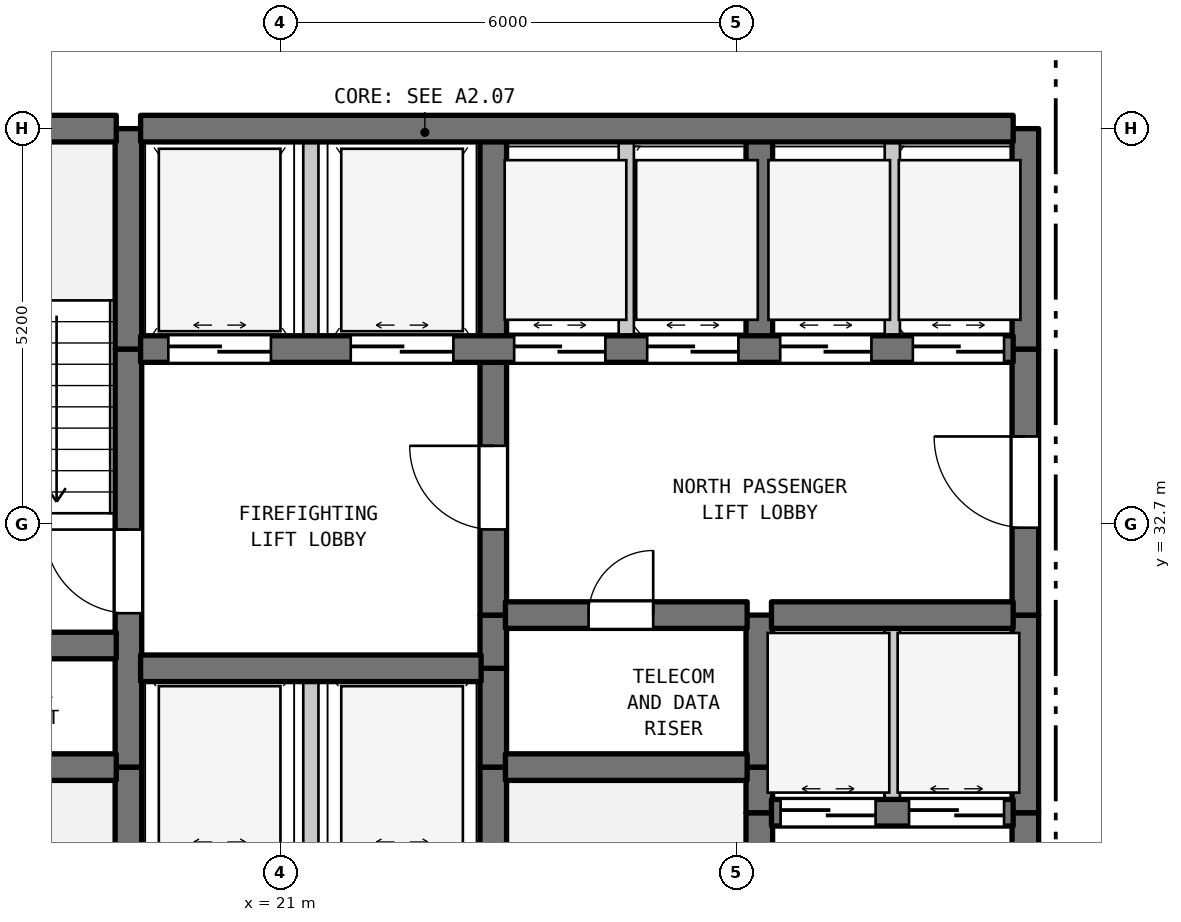
"""IFC4 building model, lengths in metres.
Left out: names, types, materials, properties, quantities, classifications, styles, units other than length and angle.
Written with IfcOpenShell. Run it as: python <this file> out.ifc"""

import sys

from ifc_helpers import new_model, si_unit, direction, frame, frame_2d, origin, place, context, subcontext, project, spatial, rectangle, extrude, element, fill, save


model = new_model("IFC4")
c1 = context("Model", 3, precision=1e-05, world=origin(), true_north=direction((0.0, 1.0)))
c2 = subcontext(c1, "Body", "Model", "MODEL_VIEW")
j1 = project(units=[si_unit("LENGTHUNIT", "METRE"), si_unit("PLANEANGLEUNIT", "RADIAN")], contexts=[c1])
p1 = place(None, origin())
s1 = spatial("IfcSite", under=j1, at=p1, CompositionType="ELEMENT")
p2 = place(p1, origin())
s2 = spatial("IfcBuilding", under=s1, at=p2, CompositionType="ELEMENT")
p3 = place(p2, frame((0.0, 0.0, 49.9)))
s3 = spatial("IfcBuildingStorey", under=s2, at=p3, CompositionType="ELEMENT", Elevation=49.9)
p4 = place(p3, frame((19.0, 28.2, 0.0), z_axis=(0.0, 0.0, 1.0), x_axis=(0.0, 1.0, 0.0)))
e1 = element("IfcWall", 1, at=p4, inside=s3, PredefinedType="SHEAR", context=c2, shape_type="SweptSolid", body=[
    extrude(rectangle(XDim=1.3, YDim=0.35, at=frame_2d((0.65, 0.0))), origin(), (0.0, 0.0, 1.0), 3.385),
])
p5 = place(p3, frame((19.0, 29.5, 0.0), z_axis=(0.0, 0.0, 1.0), x_axis=(0.0, 1.0, 0.0)))
e2 = element("IfcWall", 2, at=p5, inside=s3, PredefinedType="SHEAR", context=c2, shape_type="SweptSolid", body=[
    extrude(rectangle(XDim=5.5, YDim=0.35, at=frame_2d((2.75, 0.0))), origin(), (0.0, 0.0, 1.0), 3.385),
])
p6 = place(p5, frame((2.025, 0.0, 0.0)))
e3 = element("IfcOpeningElement", 3, at=p6, cuts=e2, PredefinedType="OPENING", context=c2, shape_type="SweptSolid", body=[
    extrude(rectangle(XDim=1.1, YDim=2.15, at=frame_2d((0.55, 1.075))), frame((0.0, 0.185, 0.0), z_axis=(0.0, -1.0, 0.0), x_axis=(1.0, 0.0, 0.0)), (0.0, 0.0, 1.0), 0.37),
])
p7 = place(p3, frame((19.0, 35.0, 0.0), z_axis=(0.0, 0.0, 1.0), x_axis=(0.0, 1.0, 0.0)))
e4 = element("IfcWall", 4, at=p7, inside=s3, PredefinedType="SHEAR", context=c2, shape_type="SweptSolid", body=[
    extrude(rectangle(XDim=2.9, YDim=0.35, at=frame_2d((1.45, 0.0))), origin(), (0.0, 0.0, 1.0), 3.385),
])
p8 = place(p3, frame((21.4, 28.2, 0.0), z_axis=(0.0, 0.0, 1.0), x_axis=(0.0, 1.0, 0.0)))
e5 = element("IfcWall", 5, at=p8, inside=s3, PredefinedType="STANDARD", context=c2, shape_type="SweptSolid", body=[
    extrude(rectangle(XDim=2.6, YDim=0.2, at=frame_2d((1.3, 0.0))), origin(), (0.0, 0.0, 1.0), 3.385),
])
p9 = place(p3, frame((21.4, 35.0, 0.0), z_axis=(0.0, 0.0, 1.0), x_axis=(0.0, 1.0, 0.0)))
e6 = element("IfcWall", 6, at=p9, inside=s3, PredefinedType="STANDARD", context=c2, shape_type="SweptSolid", body=[
    extrude(rectangle(XDim=2.9, YDim=0.2, at=frame_2d((1.45, 0.0))), origin(), (0.0, 0.0, 1.0), 3.385),
])
for number, where, z_axis, x_axis in (
    (7, (23.8, 28.2, 0.0), (0.0, 0.0, 1.0), (0.0, 1.0, 0.0)),
    (8, (23.8, 29.5, 0.0), (0.0, 0.0, 1.0), (0.0, 1.0, 0.0)),
):
    element("IfcWall", number, at=place(p3, frame(where, z_axis=z_axis, x_axis=x_axis)), inside=s3, PredefinedType="SHEAR", context=c2, shape_type="SweptSolid", body=[
        extrude(rectangle(XDim=1.3, YDim=0.35, at=frame_2d((0.65, 0.0))), origin(), (0.0, 0.0, 1.0), 3.385),
    ])
p10 = place(p3, frame((23.8, 30.8, 0.0), z_axis=(0.0, 0.0, 1.0), x_axis=(0.0, 1.0, 0.0)))
e9 = element("IfcWall", 9, at=p10, inside=s3, PredefinedType="SHEAR", context=c2, shape_type="SweptSolid", body=[
    extrude(rectangle(XDim=0.7, YDim=0.35, at=frame_2d((0.35, 0.0))), origin(), (0.0, 0.0, 1.0), 3.385),
])
p11 = place(p3, frame((23.8, 31.5, 0.0), z_axis=(0.0, 0.0, 1.0), x_axis=(0.0, 1.0, 0.0)))
e10 = element("IfcWall", 10, at=p11, inside=s3, PredefinedType="SHEAR", context=c2, shape_type="SweptSolid", body=[
    extrude(rectangle(XDim=3.5, YDim=0.35, at=frame_2d((1.75, 0.0))), origin(), (0.0, 0.0, 1.0), 3.385),
])
p12 = place(p11, frame((1.127, 0.0, 0.0)))
e11 = element("IfcOpeningElement", 11, at=p12, cuts=e10, PredefinedType="OPENING", context=c2, shape_type="SweptSolid", body=[
    extrude(rectangle(XDim=1.1, YDim=2.15, at=frame_2d((0.55, 1.075))), frame((0.0, 0.185, 0.0), z_axis=(0.0, -1.0, 0.0), x_axis=(1.0, 0.0, 0.0)), (0.0, 0.0, 1.0), 0.37),
])
p13 = place(p3, frame((23.8, 35.0, 0.0), z_axis=(0.0, 0.0, 1.0), x_axis=(0.0, 1.0, 0.0)))
e12 = element("IfcWall", 12, at=p13, inside=s3, PredefinedType="SHEAR", context=c2, shape_type="SweptSolid", body=[
    extrude(rectangle(XDim=2.9, YDim=0.35, at=frame_2d((1.45, 0.0))), origin(), (0.0, 0.0, 1.0), 3.385),
])
p14 = place(p3, frame((25.55, 35.0, 0.0), z_axis=(0.0, 0.0, 1.0), x_axis=(0.0, 1.0, 0.0)))
e13 = element("IfcWall", 13, at=p14, inside=s3, PredefinedType="STANDARD", context=c2, shape_type="SweptSolid", body=[
    extrude(rectangle(XDim=2.9, YDim=0.2, at=frame_2d((1.45, 0.0))), origin(), (0.0, 0.0, 1.0), 3.385),
])
p15 = place(p3, frame((27.3, 25.6, 0.0), z_axis=(0.0, 0.0, 1.0), x_axis=(0.0, 1.0, 0.0)))
e14 = element("IfcWall", 14, at=p15, inside=s3, PredefinedType="SHEAR", context=c2, shape_type="SweptSolid", body=[
    extrude(rectangle(XDim=3.3, YDim=0.35, at=frame_2d((1.65, 0.0))), origin(), (0.0, 0.0, 1.0), 3.385),
])
p16 = place(p3, frame((27.3, 28.9, 0.0), z_axis=(0.0, 0.0, 1.0), x_axis=(0.0, 1.0, 0.0)))
e15 = element("IfcWall", 15, at=p16, inside=s3, PredefinedType="SHEAR", context=c2, shape_type="SweptSolid", body=[
    extrude(rectangle(XDim=0.6, YDim=0.35, at=frame_2d((0.3, 0.0))), origin(), (0.0, 0.0, 1.0), 3.385),
])
p17 = place(p3, frame((27.3, 29.5, 0.0), z_axis=(0.0, 0.0, 1.0), x_axis=(0.0, 1.0, 0.0)))
e16 = element("IfcWall", 16, at=p17, inside=s3, PredefinedType="SHEAR", context=c2, shape_type="SweptSolid", body=[
    extrude(rectangle(XDim=2.0, YDim=0.35, at=frame_2d((1.0, 0.0))), origin(), (0.0, 0.0, 1.0), 3.385),
])
p18 = place(p3, frame((27.3, 35.0, 0.0), z_axis=(0.0, 0.0, 1.0), x_axis=(0.0, 1.0, 0.0)))
e17 = element("IfcWall", 17, at=p18, inside=s3, PredefinedType="SHEAR", context=c2, shape_type="SweptSolid", body=[
    extrude(rectangle(XDim=2.9, YDim=0.35, at=frame_2d((1.45, 0.0))), origin(), (0.0, 0.0, 1.0), 3.385),
])
p19 = place(p3, frame((29.05, 28.9, 0.0), z_axis=(0.0, 0.0, 1.0), x_axis=(0.0, 1.0, 0.0)))
e18 = element("IfcWall", 18, at=p19, inside=s3, PredefinedType="STANDARD", context=c2, shape_type="SweptSolid", body=[
    extrude(rectangle(XDim=2.6, YDim=0.2, at=frame_2d((1.3, 0.0))), origin(), (0.0, 0.0, 1.0), 3.385),
])
p20 = place(p3, frame((29.05, 35.0, 0.0), z_axis=(0.0, 0.0, 1.0), x_axis=(0.0, 1.0, 0.0)))
e19 = element("IfcWall", 19, at=p20, inside=s3, PredefinedType="STANDARD", context=c2, shape_type="SweptSolid", body=[
    extrude(rectangle(XDim=2.9, YDim=0.2, at=frame_2d((1.45, 0.0))), origin(), (0.0, 0.0, 1.0), 3.385),
])
p21 = place(p3, frame((30.8, 25.6, 0.0), z_axis=(0.0, 0.0, 1.0), x_axis=(0.0, 1.0, 0.0)))
e20 = element("IfcWall", 20, at=p21, inside=s3, PredefinedType="SHEAR", context=c2, shape_type="SweptSolid", body=[
    extrude(rectangle(XDim=3.3, YDim=0.35, at=frame_2d((1.65, 0.0))), origin(), (0.0, 0.0, 1.0), 3.385),
])
p22 = place(p21, frame((0.978, 0.0, 0.0)))
e21 = element("IfcOpeningElement", 21, at=p22, cuts=e20, PredefinedType="OPENING", context=c2, shape_type="SweptSolid", body=[
    extrude(rectangle(XDim=1.2, YDim=2.2, at=frame_2d((0.6, 1.1))), frame((0.0, 0.185, 0.0), z_axis=(0.0, -1.0, 0.0), x_axis=(1.0, 0.0, 0.0)), (0.0, 0.0, 1.0), 0.37),
])
p23 = place(p3, frame((30.8, 28.9, 0.0), z_axis=(0.0, 0.0, 1.0), x_axis=(0.0, 1.0, 0.0)))
e22 = element("IfcWall", 22, at=p23, inside=s3, PredefinedType="SHEAR", context=c2, shape_type="SweptSolid", body=[
    extrude(rectangle(XDim=2.6, YDim=0.35, at=frame_2d((1.3, 0.0))), origin(), (0.0, 0.0, 1.0), 3.385),
])
p24 = place(p3, frame((30.8, 31.5, 0.0), z_axis=(0.0, 0.0, 1.0), x_axis=(0.0, 1.0, 0.0)))
e23 = element("IfcWall", 23, at=p24, inside=s3, PredefinedType="SHEAR", context=c2, shape_type="SweptSolid", body=[
    extrude(rectangle(XDim=3.5, YDim=0.35, at=frame_2d((1.75, 0.0))), origin(), (0.0, 0.0, 1.0), 3.385),
])
p25 = place(p24, frame((1.15, 0.0, 0.0)))
e24 = element("IfcOpeningElement", 24, at=p25, cuts=e23, PredefinedType="OPENING", context=c2, shape_type="SweptSolid", body=[
    extrude(rectangle(XDim=1.2, YDim=2.2, at=frame_2d((0.6, 1.1))), frame((0.0, 0.185, 0.0), z_axis=(0.0, -1.0, 0.0), x_axis=(1.0, 0.0, 0.0)), (0.0, 0.0, 1.0), 0.37),
])
p26 = place(p3, frame((30.8, 35.0, 0.0), z_axis=(0.0, 0.0, 1.0), x_axis=(0.0, 1.0, 0.0)))
e25 = element("IfcWall", 25, at=p26, inside=s3, PredefinedType="SHEAR", context=c2, shape_type="SweptSolid", body=[
    extrude(rectangle(XDim=2.9, YDim=0.35, at=frame_2d((1.45, 0.0))), origin(), (0.0, 0.0, 1.0), 3.385),
])
p27 = place(p3, frame((27.46, 28.9, 0.0), z_axis=(0.0, 0.0, 1.0), x_axis=(1.0, 0.0, 0.0)))
e26 = element("IfcWall", 26, at=p27, inside=s3, PredefinedType="SHEAR", context=c2, shape_type="SweptSolid", body=[
    extrude(rectangle(XDim=3.18, YDim=0.35, at=frame_2d((1.59, 0.0))), origin(), (0.0, 0.0, 1.0), 3.385),
])
p28 = place(p27, frame((0.12, 0.0, 0.0)))
e27 = element("IfcOpeningElement", 27, at=p28, cuts=e26, PredefinedType="OPENING", context=c2, shape_type="SweptSolid", body=[
    extrude(rectangle(XDim=1.25, YDim=2.2, at=frame_2d((0.625, 1.1))), frame((0.0, 0.185, 0.0), z_axis=(0.0, -1.0, 0.0), x_axis=(1.0, 0.0, 0.0)), (0.0, 0.0, 1.0), 0.37),
])
p29 = place(p27, frame((1.81, 0.0, 0.0)))
e28 = element("IfcOpeningElement", 28, at=p29, cuts=e26, PredefinedType="OPENING", context=c2, shape_type="SweptSolid", body=[
    extrude(rectangle(XDim=1.25, YDim=2.2, at=frame_2d((0.625, 1.1))), frame((0.0, 0.185, 0.0), z_axis=(0.0, -1.0, 0.0), x_axis=(1.0, 0.0, 0.0)), (0.0, 0.0, 1.0), 0.37),
])
p30 = place(p3, frame((15.16, 29.5, 0.0), z_axis=(0.0, 0.0, 1.0), x_axis=(1.0, 0.0, 0.0)))
e29 = element("IfcWall", 29, at=p30, inside=s3, PredefinedType="SHEAR", context=c2, shape_type="SweptSolid", body=[
    extrude(rectangle(XDim=3.68, YDim=0.35, at=frame_2d((1.84, 0.0))), origin(), (0.0, 0.0, 1.0), 3.385),
])
p31 = place(p3, frame((23.96, 29.5, 0.0), z_axis=(0.0, 0.0, 1.0), x_axis=(1.0, 0.0, 0.0)))
e30 = element("IfcWall", 30, at=p31, inside=s3, PredefinedType="SHEAR", context=c2, shape_type="SweptSolid", body=[
    extrude(rectangle(XDim=3.18, YDim=0.35, at=frame_2d((1.59, 0.0))), origin(), (0.0, 0.0, 1.0), 3.385),
])
p32 = place(p3, frame((19.16, 30.8, 0.0), z_axis=(0.0, 0.0, 1.0), x_axis=(1.0, 0.0, 0.0)))
e31 = element("IfcWall", 31, at=p32, inside=s3, PredefinedType="SHEAR", context=c2, shape_type="SweptSolid", body=[
    extrude(rectangle(XDim=4.48, YDim=0.35, at=frame_2d((2.24, 0.0))), origin(), (0.0, 0.0, 1.0), 3.385),
])
p33 = place(p3, frame((15.16, 31.1, 0.0), z_axis=(0.0, 0.0, 1.0), x_axis=(1.0, 0.0, 0.0)))
e32 = element("IfcWall", 32, at=p33, inside=s3, PredefinedType="SHEAR", context=c2, shape_type="SweptSolid", body=[
    extrude(rectangle(XDim=3.68, YDim=0.35, at=frame_2d((1.84, 0.0))), origin(), (0.0, 0.0, 1.0), 3.385),
])
p34 = place(p3, frame((23.96, 31.5, 0.0), z_axis=(0.0, 0.0, 1.0), x_axis=(1.0, 0.0, 0.0)))
e33 = element("IfcWall", 33, at=p34, inside=s3, PredefinedType="SHEAR", context=c2, shape_type="SweptSolid", body=[
    extrude(rectangle(XDim=3.18, YDim=0.35, at=frame_2d((1.59, 0.0))), origin(), (0.0, 0.0, 1.0), 3.385),
])
p35 = place(p34, frame((1.094, 0.0, 0.0)))
e34 = element("IfcOpeningElement", 34, at=p35, cuts=e33, PredefinedType="OPENING", context=c2, shape_type="SweptSolid", body=[
    extrude(rectangle(XDim=0.85, YDim=2.1, at=frame_2d((0.425, 1.05))), frame((0.0, 0.185, 0.0), z_axis=(0.0, -1.0, 0.0), x_axis=(1.0, 0.0, 0.0)), (0.0, 0.0, 1.0), 0.37),
])
p36 = place(p3, frame((27.46, 31.5, 0.0), z_axis=(0.0, 0.0, 1.0), x_axis=(1.0, 0.0, 0.0)))
e35 = element("IfcWall", 35, at=p36, inside=s3, PredefinedType="SHEAR", context=c2, shape_type="SweptSolid", body=[
    extrude(rectangle(XDim=3.18, YDim=0.35, at=frame_2d((1.59, 0.0))), origin(), (0.0, 0.0, 1.0), 3.385),
])
p37 = place(p3, frame((19.16, 35.0, 0.0), z_axis=(0.0, 0.0, 1.0), x_axis=(1.0, 0.0, 0.0)))
e36 = element("IfcWall", 36, at=p37, inside=s3, PredefinedType="SHEAR", context=c2, shape_type="SweptSolid", body=[
    extrude(rectangle(XDim=11.48, YDim=0.35, at=frame_2d((5.74, 0.0))), origin(), (0.0, 0.0, 1.0), 3.385),
])
p38 = place(p37, frame((0.365, 0.0, 0.0)))
e37 = element("IfcOpeningElement", 37, at=p38, cuts=e36, PredefinedType="OPENING", context=c2, shape_type="SweptSolid", body=[
    extrude(rectangle(XDim=1.35, YDim=2.2, at=frame_2d((0.675, 1.1))), frame((0.0, 0.185, 0.0), z_axis=(0.0, -1.0, 0.0), x_axis=(1.0, 0.0, 0.0)), (0.0, 0.0, 1.0), 0.37),
])
p39 = place(p37, frame((2.765, 0.0, 0.0)))
e38 = element("IfcOpeningElement", 38, at=p39, cuts=e36, PredefinedType="OPENING", context=c2, shape_type="SweptSolid", body=[
    extrude(rectangle(XDim=1.35, YDim=2.2, at=frame_2d((0.675, 1.1))), frame((0.0, 0.185, 0.0), z_axis=(0.0, -1.0, 0.0), x_axis=(1.0, 0.0, 0.0)), (0.0, 0.0, 1.0), 0.37),
])
p40 = place(p37, frame((4.915, 0.0, 0.0)))
e39 = element("IfcOpeningElement", 39, at=p40, cuts=e36, PredefinedType="OPENING", context=c2, shape_type="SweptSolid", body=[
    extrude(rectangle(XDim=1.2, YDim=2.2, at=frame_2d((0.6, 1.1))), frame((0.0, 0.185, 0.0), z_axis=(0.0, -1.0, 0.0), x_axis=(1.0, 0.0, 0.0)), (0.0, 0.0, 1.0), 0.37),
])
p41 = place(p37, frame((6.665, 0.0, 0.0)))
e40 = element("IfcOpeningElement", 40, at=p41, cuts=e36, PredefinedType="OPENING", context=c2, shape_type="SweptSolid", body=[
    extrude(rectangle(XDim=1.2, YDim=2.2, at=frame_2d((0.6, 1.1))), frame((0.0, 0.185, 0.0), z_axis=(0.0, -1.0, 0.0), x_axis=(1.0, 0.0, 0.0)), (0.0, 0.0, 1.0), 0.37),
])
p42 = place(p37, frame((8.415, 0.0, 0.0)))
e41 = element("IfcOpeningElement", 41, at=p42, cuts=e36, PredefinedType="OPENING", context=c2, shape_type="SweptSolid", body=[
    extrude(rectangle(XDim=1.2, YDim=2.2, at=frame_2d((0.6, 1.1))), frame((0.0, 0.185, 0.0), z_axis=(0.0, -1.0, 0.0), x_axis=(1.0, 0.0, 0.0)), (0.0, 0.0, 1.0), 0.37),
])
p43 = place(p37, frame((10.16, 0.0, 0.0)))
e42 = element("IfcOpeningElement", 42, at=p43, cuts=e36, PredefinedType="OPENING", context=c2, shape_type="SweptSolid", body=[
    extrude(rectangle(XDim=1.2, YDim=2.2, at=frame_2d((0.6, 1.1))), frame((0.0, 0.185, 0.0), z_axis=(0.0, -1.0, 0.0), x_axis=(1.0, 0.0, 0.0)), (0.0, 0.0, 1.0), 0.37),
])
p44 = place(p3, frame((15.16, 37.9, 0.0), z_axis=(0.0, 0.0, 1.0), x_axis=(1.0, 0.0, 0.0)))
e43 = element("IfcWall", 43, at=p44, inside=s3, PredefinedType="SHEAR", context=c2, shape_type="SweptSolid", body=[
    extrude(rectangle(XDim=3.68, YDim=0.35, at=frame_2d((1.84, 0.0))), origin(), (0.0, 0.0, 1.0), 3.385),
])
p45 = place(p3, frame((19.16, 37.9, 0.0), z_axis=(0.0, 0.0, 1.0), x_axis=(1.0, 0.0, 0.0)))
e44 = element("IfcWall", 44, at=p45, inside=s3, PredefinedType="SHEAR", context=c2, shape_type="SweptSolid", body=[
    extrude(rectangle(XDim=11.48, YDim=0.35, at=frame_2d((5.74, 0.0))), origin(), (0.0, 0.0, 1.0), 3.385),
])
p46 = place(p6, origin())
e45 = element("IfcDoor", 45, at=p46, inside=s3, OperationType="SINGLE_SWING_RIGHT", PredefinedType="DOOR", context=c2, shape_type="SweptSolid", body=[
    extrude(rectangle(XDim=1.1, YDim=2.15, at=frame_2d((0.55, 1.075))), frame((0.0, 0.025, 0.0), z_axis=(0.0, -1.0, 0.0), x_axis=(1.0, 0.0, 0.0)), (0.0, 0.0, 1.0), 0.05),
])
fill(e3, e45)
p47 = place(p12, origin())
e46 = element("IfcDoor", 46, at=p47, inside=s3, OperationType="SINGLE_SWING_RIGHT", PredefinedType="DOOR", context=c2, shape_type="SweptSolid", body=[
    extrude(rectangle(XDim=1.1, YDim=2.15, at=frame_2d((0.55, 1.075))), frame((0.0, 0.025, 0.0), z_axis=(0.0, -1.0, 0.0), x_axis=(1.0, 0.0, 0.0)), (0.0, 0.0, 1.0), 0.05),
])
fill(e11, e46)
p48 = place(p25, origin())
e47 = element("IfcDoor", 47, at=p48, inside=s3, OperationType="SINGLE_SWING_RIGHT", PredefinedType="DOOR", context=c2, shape_type="SweptSolid", body=[
    extrude(rectangle(XDim=1.2, YDim=2.2, at=frame_2d((0.6, 1.1))), frame((0.0, 0.025, 0.0), z_axis=(0.0, -1.0, 0.0), x_axis=(1.0, 0.0, 0.0)), (0.0, 0.0, 1.0), 0.05),
])
fill(e24, e47)
p49 = place(p28, origin())
e48 = element("IfcDoor", 48, at=p49, inside=s3, OperationType="DOUBLE_DOOR_SLIDING", PredefinedType="DOOR", context=c2, shape_type="SweptSolid", body=[
    extrude(rectangle(XDim=1.25, YDim=2.2, at=frame_2d((0.625, 1.1))), frame((0.0, 0.025, 0.0), z_axis=(0.0, -1.0, 0.0), x_axis=(1.0, 0.0, 0.0)), (0.0, 0.0, 1.0), 0.05),
])
fill(e27, e48)
p50 = place(p29, origin())
e49 = element("IfcDoor", 49, at=p50, inside=s3, OperationType="DOUBLE_DOOR_SLIDING", PredefinedType="DOOR", context=c2, shape_type="SweptSolid", body=[
    extrude(rectangle(XDim=1.25, YDim=2.2, at=frame_2d((0.625, 1.1))), frame((0.0, 0.025, 0.0), z_axis=(0.0, -1.0, 0.0), x_axis=(1.0, 0.0, 0.0)), (0.0, 0.0, 1.0), 0.05),
])
fill(e28, e49)
p51 = place(p35, origin())
e50 = element("IfcDoor", 50, at=p51, inside=s3, OperationType="SINGLE_SWING_RIGHT", PredefinedType="DOOR", context=c2, shape_type="SweptSolid", body=[
    extrude(rectangle(XDim=0.85, YDim=2.1, at=frame_2d((0.425, 1.05))), frame((0.0, 0.025, 0.0), z_axis=(0.0, -1.0, 0.0), x_axis=(1.0, 0.0, 0.0)), (0.0, 0.0, 1.0), 0.05),
])
fill(e34, e50)
p52 = place(p38, origin())
e51 = element("IfcDoor", 51, at=p52, inside=s3, OperationType="DOUBLE_DOOR_SLIDING", PredefinedType="DOOR", context=c2, shape_type="SweptSolid", body=[
    extrude(rectangle(XDim=1.35, YDim=2.2, at=frame_2d((0.675, 1.1))), frame((0.0, 0.025, 0.0), z_axis=(0.0, -1.0, 0.0), x_axis=(1.0, 0.0, 0.0)), (0.0, 0.0, 1.0), 0.05),
])
fill(e37, e51)
p53 = place(p39, origin())
e52 = element("IfcDoor", 52, at=p53, inside=s3, OperationType="DOUBLE_DOOR_SLIDING", PredefinedType="DOOR", context=c2, shape_type="SweptSolid", body=[
    extrude(rectangle(XDim=1.35, YDim=2.2, at=frame_2d((0.675, 1.1))), frame((0.0, 0.025, 0.0), z_axis=(0.0, -1.0, 0.0), x_axis=(1.0, 0.0, 0.0)), (0.0, 0.0, 1.0), 0.05),
])
fill(e38, e52)
p54 = place(p40, origin())
e53 = element("IfcDoor", 53, at=p54, inside=s3, OperationType="DOUBLE_DOOR_SLIDING", PredefinedType="DOOR", context=c2, shape_type="SweptSolid", body=[
    extrude(rectangle(XDim=1.2, YDim=2.2, at=frame_2d((0.6, 1.1))), frame((0.0, 0.025, 0.0), z_axis=(0.0, -1.0, 0.0), x_axis=(1.0, 0.0, 0.0)), (0.0, 0.0, 1.0), 0.05),
])
fill(e39, e53)
p55 = place(p41, origin())
e54 = element("IfcDoor", 54, at=p55, inside=s3, OperationType="DOUBLE_DOOR_SLIDING", PredefinedType="DOOR", context=c2, shape_type="SweptSolid", body=[
    extrude(rectangle(XDim=1.2, YDim=2.2, at=frame_2d((0.6, 1.1))), frame((0.0, 0.025, 0.0), z_axis=(0.0, -1.0, 0.0), x_axis=(1.0, 0.0, 0.0)), (0.0, 0.0, 1.0), 0.05),
])
fill(e40, e54)
p56 = place(p42, origin())
e55 = element("IfcDoor", 55, at=p56, inside=s3, OperationType="DOUBLE_DOOR_SLIDING", PredefinedType="DOOR", context=c2, shape_type="SweptSolid", body=[
    extrude(rectangle(XDim=1.2, YDim=2.2, at=frame_2d((0.6, 1.1))), frame((0.0, 0.025, 0.0), z_axis=(0.0, -1.0, 0.0), x_axis=(1.0, 0.0, 0.0)), (0.0, 0.0, 1.0), 0.05),
])
fill(e41, e55)
p57 = place(p43, origin())
e56 = element("IfcDoor", 56, at=p57, inside=s3, OperationType="DOUBLE_DOOR_SLIDING", PredefinedType="DOOR", context=c2, shape_type="SweptSolid", body=[
    extrude(rectangle(XDim=1.2, YDim=2.2, at=frame_2d((0.6, 1.1))), frame((0.0, 0.025, 0.0), z_axis=(0.0, -1.0, 0.0), x_axis=(1.0, 0.0, 0.0)), (0.0, 0.0, 1.0), 0.05),
])
fill(e42, e56)
save(model, sys.argv[1])
